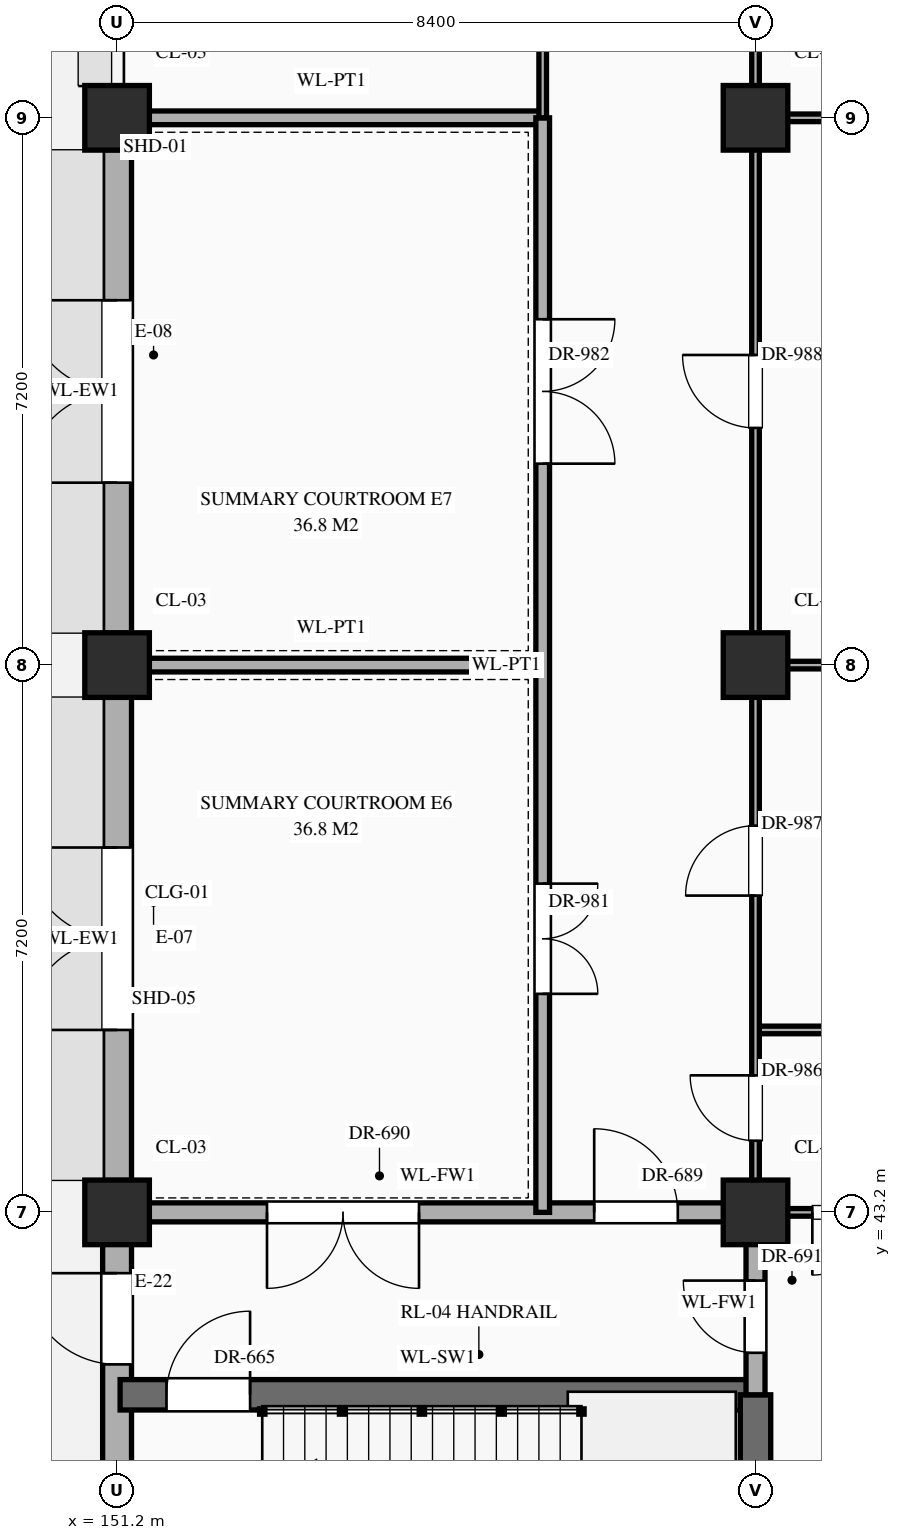
"""IFC4 building model, lengths in metres.
Left out: names, types, materials, properties, quantities, classifications, styles, units other than length and angle.
Written with IfcOpenShell. Run it as: python <this file> out.ifc"""

import sys

from ifc_helpers import new_model, si_unit, direction, frame, frame_2d, origin, origin_2d, place, context, subcontext, project, spatial, rectangle, extrude, element, fill, save


model = new_model("IFC4")
c1 = context("Model", 3, precision=1e-05, world=origin(), true_north=direction((0.0, 1.0)))
c2 = subcontext(c1, "Body", "Model", "MODEL_VIEW")
j1 = project(units=[si_unit("LENGTHUNIT", "METRE"), si_unit("PLANEANGLEUNIT", "RADIAN")], contexts=[c1])
p1 = place(None, origin())
s1 = spatial("IfcSite", under=j1, at=p1, CompositionType="ELEMENT")
p2 = place(p1, origin())
s2 = spatial("IfcBuilding", under=s1, at=p2, CompositionType="ELEMENT")
p3 = place(p2, origin())
s3 = spatial("IfcBuildingStorey", under=s2, at=p3, CompositionType="ELEMENT", Elevation=0.0)
for number, where, z_axis, x_axis in (
    (1, (151.2, 43.2, 0.0), (0.0, 0.0, 1.0), (1.0, 0.0, 0.0)),
    (2, (151.2, 50.4, 0.0), (0.0, 0.0, 1.0), (1.0, 0.0, 0.0)),
    (3, (151.2, 57.6, 0.0), (0.0, 0.0, 1.0), (1.0, 0.0, 0.0)),
    (4, (159.6, 43.2, 0.0), (0.0, 0.0, 1.0), (1.0, 0.0, 0.0)),
    (5, (159.6, 50.4, 0.0), (0.0, 0.0, 1.0), (1.0, 0.0, 0.0)),
    (6, (159.6, 57.6, 0.0), (0.0, 0.0, 1.0), (1.0, 0.0, 0.0)),
):
    element("IfcColumn", number, at=place(p3, frame(where, z_axis=z_axis, x_axis=x_axis)), inside=s3, PredefinedType="COLUMN", context=c2, shape_type="SweptSolid", body=[
        extrude(rectangle(XDim=0.85, YDim=0.85, at=origin_2d()), origin(), (0.0, 0.0, 1.0), 5.4),
    ])
p4 = place(p3, frame((151.2, 36.42, 0.0), z_axis=(0.0, 0.0, 1.0), x_axis=(0.0, 1.0, 0.0)))
e7 = element("IfcWall", 7, at=p4, inside=s3, PredefinedType="STANDARD", context=c2, shape_type="SweptSolid", body=[
    extrude(rectangle(XDim=6.36, YDim=0.38, at=frame_2d((3.18, 0.0))), origin(), (0.0, 0.0, 1.0), 4.47),
])
p5 = place(p4, frame((4.78, 0.0, 0.0)))
e8 = element("IfcOpeningElement", 8, at=p5, cuts=e7, PredefinedType="OPENING", context=c2, shape_type="SweptSolid", body=[
    extrude(rectangle(XDim=1.2, YDim=2.2, at=frame_2d((0.6, 1.1))), frame((0.0, 0.202, 0.0), z_axis=(0.0, -1.0, 0.0), x_axis=(1.0, 0.0, 0.0)), (0.0, 0.0, 1.0), 0.404),
])
p6 = place(p3, frame((151.2, 43.62, 0.0), z_axis=(0.0, 0.0, 1.0), x_axis=(0.0, 1.0, 0.0)))
e9 = element("IfcWall", 9, at=p6, inside=s3, PredefinedType="STANDARD", context=c2, shape_type="SweptSolid", body=[
    extrude(rectangle(XDim=6.36, YDim=0.38, at=frame_2d((3.18, 0.0))), origin(), (0.0, 0.0, 1.0), 4.47),
])
p7 = place(p6, frame((1.98, 0.0, 0.0)))
e10 = element("IfcOpeningElement", 10, at=p7, cuts=e9, PredefinedType="OPENING", context=c2, shape_type="SweptSolid", body=[
    extrude(rectangle(XDim=2.4, YDim=2.4, at=frame_2d((1.2, 1.2))), frame((0.0, 0.202, 0.0), z_axis=(0.0, -1.0, 0.0), x_axis=(1.0, 0.0, 0.0)), (0.0, 0.0, 1.0), 0.404),
])
p8 = place(p3, frame((151.2, 50.82, 0.0), z_axis=(0.0, 0.0, 1.0), x_axis=(0.0, 1.0, 0.0)))
e11 = element("IfcWall", 11, at=p8, inside=s3, PredefinedType="STANDARD", context=c2, shape_type="SweptSolid", body=[
    extrude(rectangle(XDim=6.36, YDim=0.38, at=frame_2d((3.18, 0.0))), origin(), (0.0, 0.0, 1.0), 4.47),
])
p9 = place(p8, frame((1.98, 0.0, 0.0)))
e12 = element("IfcOpeningElement", 12, at=p9, cuts=e11, PredefinedType="OPENING", context=c2, shape_type="SweptSolid", body=[
    extrude(rectangle(XDim=2.4, YDim=2.4, at=frame_2d((1.2, 1.2))), frame((0.0, 0.202, 0.0), z_axis=(0.0, -1.0, 0.0), x_axis=(1.0, 0.0, 0.0)), (0.0, 0.0, 1.0), 0.404),
])
p10 = place(p3, frame((151.24, 40.8, 0.0), z_axis=(0.0, 0.0, 1.0), x_axis=(1.0, 0.0, 0.0)))
e13 = element("IfcWall", 13, at=p10, inside=s3, PredefinedType="SHEAR", context=c2, shape_type="SweptSolid", body=[
    extrude(rectangle(XDim=8.36, YDim=0.4, at=frame_2d((4.18, 0.0))), origin(), (0.0, 0.0, 1.0), 5.12),
])
p11 = place(p10, frame((0.61, 0.0, 0.0)))
e14 = element("IfcOpeningElement", 14, at=p11, cuts=e13, PredefinedType="OPENING", context=c2, shape_type="SweptSolid", body=[
    extrude(rectangle(XDim=1.1, YDim=2.2, at=frame_2d((0.55, 1.1))), frame((0.0, 0.212, 0.0), z_axis=(0.0, -1.0, 0.0), x_axis=(1.0, 0.0, 0.0)), (0.0, 0.0, 1.0), 0.424),
])
p12 = place(p3, frame((151.24, 43.2, 0.0), z_axis=(0.0, 0.0, 1.0), x_axis=(1.0, 0.0, 0.0)))
e15 = element("IfcWall", 15, at=p12, inside=s3, PredefinedType="STANDARD", context=c2, shape_type="SweptSolid", body=[
    extrude(rectangle(XDim=8.36, YDim=0.25, at=frame_2d((4.18, 0.0))), origin(), (0.0, 0.0, 1.0), 4.27),
])
p13 = place(p12, frame((6.238, 0.0, 0.0)))
e16 = element("IfcOpeningElement", 16, at=p13, cuts=e15, PredefinedType="OPENING", context=c2, shape_type="SweptSolid", body=[
    extrude(rectangle(XDim=1.1, YDim=2.2, at=frame_2d((0.55, 1.1))), frame((0.0, 0.137, 0.0), z_axis=(0.0, -1.0, 0.0), x_axis=(1.0, 0.0, 0.0)), (0.0, 0.0, 1.0), 0.274),
])
p14 = place(p12, frame((1.933, 0.0, 0.0)))
e17 = element("IfcOpeningElement", 17, at=p14, cuts=e15, PredefinedType="OPENING", context=c2, shape_type="SweptSolid", body=[
    extrude(rectangle(XDim=2.0, YDim=2.4, at=frame_2d((1.0, 1.2))), frame((0.0, 0.137, 0.0), z_axis=(0.0, -1.0, 0.0), x_axis=(1.0, 0.0, 0.0)), (0.0, 0.0, 1.0), 0.274),
])
p15 = place(p3, frame((159.6, 43.2, 0.0), z_axis=(0.0, 0.0, 1.0), x_axis=(1.0, 0.0, 0.0)))
e18 = element("IfcWall", 18, at=p15, inside=s3, PredefinedType="STANDARD", context=c2, shape_type="SweptSolid", body=[
    extrude(rectangle(XDim=8.36, YDim=0.1, at=frame_2d((4.18, 0.0))), origin(), (0.0, 0.0, 1.0), 4.27),
])
p16 = place(p15, frame((0.748, 0.0, 0.0)))
e19 = element("IfcOpeningElement", 19, at=p16, cuts=e18, PredefinedType="OPENING", context=c2, shape_type="SweptSolid", body=[
    extrude(rectangle(XDim=1.65, YDim=2.4, at=frame_2d((0.825, 1.2))), frame((0.0, 0.062, 0.0), z_axis=(0.0, -1.0, 0.0), x_axis=(1.0, 0.0, 0.0)), (0.0, 0.0, 1.0), 0.124),
])
p17 = place(p3, frame((159.6, 45.6, 0.0), z_axis=(0.0, 0.0, 1.0), x_axis=(1.0, 0.0, 0.0)))
e20 = element("IfcWall", 20, at=p17, inside=s3, PredefinedType="STANDARD", context=c2, shape_type="SweptSolid", body=[
    extrude(rectangle(XDim=8.36, YDim=0.1, at=frame_2d((4.18, 0.0))), origin(), (0.0, 0.0, 1.0), 5.12),
])
p18 = place(p17, frame((0.91, 0.0, 0.0)))
e21 = element("IfcOpeningElement", 21, at=p18, cuts=e20, PredefinedType="OPENING", context=c2, shape_type="SweptSolid", body=[
    extrude(rectangle(XDim=0.98, YDim=2.35, at=frame_2d((0.49, 1.175))), frame((0.0, 0.062, 0.0), z_axis=(0.0, -1.0, 0.0), x_axis=(1.0, 0.0, 0.0)), (0.0, 0.0, 1.0), 0.124),
])
p19 = place(p3, frame((151.24, 50.4, 0.0), z_axis=(0.0, 0.0, 1.0), x_axis=(1.0, 0.0, 0.0)))
e22 = element("IfcWall", 22, at=p19, inside=s3, PredefinedType="STANDARD", context=c2, shape_type="SweptSolid", body=[
    extrude(rectangle(XDim=5.56, YDim=0.18, at=frame_2d((2.78, 0.0))), origin(), (0.0, 0.0, 1.0), 4.27),
])
p20 = place(p3, frame((159.6, 50.4, 0.0), z_axis=(0.0, 0.0, 1.0), x_axis=(1.0, 0.0, 0.0)))
e23 = element("IfcWall", 23, at=p20, inside=s3, PredefinedType="STANDARD", context=c2, shape_type="SweptSolid", body=[
    extrude(rectangle(XDim=8.36, YDim=0.1, at=frame_2d((4.18, 0.0))), origin(), (0.0, 0.0, 1.0), 4.27),
])
p21 = place(p3, frame((151.24, 57.6, 0.0), z_axis=(0.0, 0.0, 1.0), x_axis=(1.0, 0.0, 0.0)))
e24 = element("IfcWall", 24, at=p21, inside=s3, PredefinedType="STANDARD", context=c2, shape_type="SweptSolid", body=[
    extrude(rectangle(XDim=5.56, YDim=0.18, at=frame_2d((2.78, 0.0))), origin(), (0.0, 0.0, 1.0), 4.27),
])
p22 = place(p3, frame((159.6, 57.6, 0.0), z_axis=(0.0, 0.0, 1.0), x_axis=(1.0, 0.0, 0.0)))
e25 = element("IfcWall", 25, at=p22, inside=s3, PredefinedType="STANDARD", context=c2, shape_type="SweptSolid", body=[
    extrude(rectangle(XDim=8.36, YDim=0.1, at=frame_2d((4.18, 0.0))), origin(), (0.0, 0.0, 1.0), 4.27),
])
p23 = place(p3, frame((156.8, 43.2, 0.0), z_axis=(0.0, 0.0, 1.0), x_axis=(0.0, 1.0, 0.0)))
e26 = element("IfcWall", 26, at=p23, inside=s3, PredefinedType="STANDARD", context=c2, shape_type="SweptSolid", body=[
    extrude(rectangle(XDim=14.4, YDim=0.18, at=frame_2d((7.2, 0.0))), origin(), (0.0, 0.0, 1.0), 5.12),
])
p24 = place(p23, frame((2.875, 0.0, 0.0)))
e27 = element("IfcOpeningElement", 27, at=p24, cuts=e26, PredefinedType="OPENING", context=c2, shape_type="SweptSolid", body=[
    extrude(rectangle(XDim=1.45, YDim=2.3, at=frame_2d((0.725, 1.15))), frame((0.0, 0.102, 0.0), z_axis=(0.0, -1.0, 0.0), x_axis=(1.0, 0.0, 0.0)), (0.0, 0.0, 1.0), 0.204),
])
p25 = place(p23, frame((9.85, 0.0, 0.0)))
e28 = element("IfcOpeningElement", 28, at=p25, cuts=e26, PredefinedType="OPENING", context=c2, shape_type="SweptSolid", body=[
    extrude(rectangle(XDim=1.9, YDim=2.5, at=frame_2d((0.95, 1.25))), frame((0.0, 0.102, 0.0), z_axis=(0.0, -1.0, 0.0), x_axis=(1.0, 0.0, 0.0)), (0.0, 0.0, 1.0), 0.204),
])
p26 = place(p3, frame((156.8, 57.6, 0.0), z_axis=(0.0, 0.0, 1.0), x_axis=(0.0, 1.0, 0.0)))
e29 = element("IfcWall", 29, at=p26, inside=s3, PredefinedType="STANDARD", context=c2, shape_type="SweptSolid", body=[
    extrude(rectangle(XDim=26.4, YDim=0.1, at=frame_2d((13.2, 0.0))), origin(), (0.0, 0.0, 1.0), 5.12),
])
p27 = place(p26, frame((23.38, 0.0, 0.0)))
e30 = element("IfcOpeningElement", 30, at=p27, cuts=e29, PredefinedType="OPENING", context=c2, shape_type="SweptSolid", body=[
    extrude(rectangle(XDim=1.24, YDim=2.3, at=frame_2d((0.62, 1.15))), frame((0.0, 0.062, 0.0), z_axis=(0.0, -1.0, 0.0), x_axis=(1.0, 0.0, 0.0)), (0.0, 0.0, 1.0), 0.124),
])
p28 = place(p26, frame((3.07, 0.0, 0.0)))
e31 = element("IfcOpeningElement", 31, at=p28, cuts=e29, PredefinedType="OPENING", context=c2, shape_type="SweptSolid", body=[
    extrude(rectangle(XDim=1.06, YDim=2.4, at=frame_2d((0.53, 1.2))), frame((0.0, 0.062, 0.0), z_axis=(0.0, -1.0, 0.0), x_axis=(1.0, 0.0, 0.0)), (0.0, 0.0, 1.0), 0.124),
])
p29 = place(p26, frame((10.23, 0.0, 0.0)))
e32 = element("IfcOpeningElement", 32, at=p29, cuts=e29, PredefinedType="OPENING", context=c2, shape_type="SweptSolid", body=[
    extrude(rectangle(XDim=1.14, YDim=2.4, at=frame_2d((0.57, 1.2))), frame((0.0, 0.062, 0.0), z_axis=(0.0, -1.0, 0.0), x_axis=(1.0, 0.0, 0.0)), (0.0, 0.0, 1.0), 0.124),
])
p30 = place(p26, frame((17.55, 0.0, 0.0)))
e33 = element("IfcOpeningElement", 33, at=p30, cuts=e29, PredefinedType="OPENING", context=c2, shape_type="SweptSolid", body=[
    extrude(rectangle(XDim=0.9, YDim=2.15, at=frame_2d((0.45, 1.075))), frame((0.0, 0.062, 0.0), z_axis=(0.0, -1.0, 0.0), x_axis=(1.0, 0.0, 0.0)), (0.0, 0.0, 1.0), 0.124),
])
p31 = place(p3, frame((159.6, 36.0, 0.0), z_axis=(0.0, 0.0, 1.0), x_axis=(0.0, 1.0, 0.0)))
e34 = element("IfcWall", 34, at=p31, inside=s3, PredefinedType="SHEAR", context=c2, shape_type="SweptSolid", body=[
    extrude(rectangle(XDim=4.8, YDim=0.4, at=frame_2d((2.4, 0.0))), origin(), (0.0, 0.0, 1.0), 5.12),
])
p32 = place(p3, frame((159.6, 40.8, 0.0), z_axis=(0.0, 0.0, 1.0), x_axis=(0.0, 1.0, 0.0)))
e35 = element("IfcWall", 35, at=p32, inside=s3, PredefinedType="STANDARD", context=c2, shape_type="SweptSolid", body=[
    extrude(rectangle(XDim=2.4, YDim=0.25, at=frame_2d((1.2, 0.0))), origin(), (0.0, 0.0, 1.0), 4.37),
])
p33 = place(p32, frame((0.552, 0.0, 0.0)))
e36 = element("IfcOpeningElement", 36, at=p33, cuts=e35, PredefinedType="OPENING", context=c2, shape_type="SweptSolid", body=[
    extrude(rectangle(XDim=0.95, YDim=2.15, at=frame_2d((0.475, 1.075))), frame((0.0, 0.137, 0.0), z_axis=(0.0, -1.0, 0.0), x_axis=(1.0, 0.0, 0.0)), (0.0, 0.0, 1.0), 0.274),
])
p34 = place(p3, frame((159.6, 43.2, 0.0), z_axis=(0.0, 0.0, 1.0), x_axis=(0.0, 1.0, 0.0)))
e37 = element("IfcWall", 37, at=p34, inside=s3, PredefinedType="STANDARD", context=c2, shape_type="SweptSolid", body=[
    extrude(rectangle(XDim=40.8, YDim=0.1, at=frame_2d((20.4, 0.0))), origin(), (0.0, 0.0, 1.0), 4.37),
])
p35 = place(p34, frame((37.933, 0.0, 0.0)))
e38 = element("IfcOpeningElement", 38, at=p35, cuts=e37, PredefinedType="OPENING", context=c2, shape_type="SweptSolid", body=[
    extrude(rectangle(XDim=1.28, YDim=2.35, at=frame_2d((0.64, 1.175))), frame((0.0, 0.062, 0.0), z_axis=(0.0, -1.0, 0.0), x_axis=(1.0, 0.0, 0.0)), (0.0, 0.0, 1.0), 0.124),
])
p36 = place(p34, frame((0.942, 0.0, 0.0)))
e39 = element("IfcOpeningElement", 39, at=p36, cuts=e37, PredefinedType="OPENING", context=c2, shape_type="SweptSolid", body=[
    extrude(rectangle(XDim=0.86, YDim=2.1, at=frame_2d((0.43, 1.05))), frame((0.0, 0.062, 0.0), z_axis=(0.0, -1.0, 0.0), x_axis=(1.0, 0.0, 0.0)), (0.0, 0.0, 1.0), 0.124),
])
p37 = place(p34, frame((4.167, 0.0, 0.0)))
e40 = element("IfcOpeningElement", 40, at=p37, cuts=e37, PredefinedType="OPENING", context=c2, shape_type="SweptSolid", body=[
    extrude(rectangle(XDim=0.92, YDim=2.15, at=frame_2d((0.46, 1.075))), frame((0.0, 0.062, 0.0), z_axis=(0.0, -1.0, 0.0), x_axis=(1.0, 0.0, 0.0)), (0.0, 0.0, 1.0), 0.124),
])
p38 = place(p34, frame((10.32, 0.0, 0.0)))
e41 = element("IfcOpeningElement", 41, at=p38, cuts=e37, PredefinedType="OPENING", context=c2, shape_type="SweptSolid", body=[
    extrude(rectangle(XDim=0.96, YDim=2.2, at=frame_2d((0.48, 1.1))), frame((0.0, 0.062, 0.0), z_axis=(0.0, -1.0, 0.0), x_axis=(1.0, 0.0, 0.0)), (0.0, 0.0, 1.0), 0.124),
])
p39 = place(p34, frame((17.5, 0.0, 0.0)))
e42 = element("IfcOpeningElement", 42, at=p39, cuts=e37, PredefinedType="OPENING", context=c2, shape_type="SweptSolid", body=[
    extrude(rectangle(XDim=1.0, YDim=2.25, at=frame_2d((0.5, 1.125))), frame((0.0, 0.062, 0.0), z_axis=(0.0, -1.0, 0.0), x_axis=(1.0, 0.0, 0.0)), (0.0, 0.0, 1.0), 0.124),
])
p40 = place(p34, frame((24.68, 0.0, 0.0)))
e43 = element("IfcOpeningElement", 43, at=p40, cuts=e37, PredefinedType="OPENING", context=c2, shape_type="SweptSolid", body=[
    extrude(rectangle(XDim=1.04, YDim=2.2, at=frame_2d((0.52, 1.1))), frame((0.0, 0.062, 0.0), z_axis=(0.0, -1.0, 0.0), x_axis=(1.0, 0.0, 0.0)), (0.0, 0.0, 1.0), 0.124),
])
p41 = place(p34, frame((31.86, 0.0, 0.0)))
e44 = element("IfcOpeningElement", 44, at=p41, cuts=e37, PredefinedType="OPENING", context=c2, shape_type="SweptSolid", body=[
    extrude(rectangle(XDim=1.08, YDim=2.25, at=frame_2d((0.54, 1.125))), frame((0.0, 0.062, 0.0), z_axis=(0.0, -1.0, 0.0), x_axis=(1.0, 0.0, 0.0)), (0.0, 0.0, 1.0), 0.124),
])
p42 = place(p5, origin())
e45 = element("IfcDoor", 45, at=p42, inside=s3, OperationType="SINGLE_SWING_RIGHT", PredefinedType="DOOR", context=c2, shape_type="SweptSolid", body=[
    extrude(rectangle(XDim=1.2, YDim=2.2, at=frame_2d((0.6, 1.1))), frame((0.0, 0.025, 0.0), z_axis=(0.0, -1.0, 0.0), x_axis=(1.0, 0.0, 0.0)), (0.0, 0.0, 1.0), 0.05),
])
fill(e8, e45)
p43 = place(p7, origin())
e46 = element("IfcDoor", 46, at=p43, inside=s3, OperationType="DOUBLE_DOOR_SINGLE_SWING", PredefinedType="DOOR", context=c2, shape_type="SweptSolid", body=[
    extrude(rectangle(XDim=2.4, YDim=2.4, at=frame_2d((1.2, 1.2))), frame((0.0, 0.025, 0.0), z_axis=(0.0, -1.0, 0.0), x_axis=(1.0, 0.0, 0.0)), (0.0, 0.0, 1.0), 0.05),
])
fill(e10, e46)
p44 = place(p9, origin())
e47 = element("IfcDoor", 47, at=p44, inside=s3, OperationType="DOUBLE_DOOR_SINGLE_SWING", PredefinedType="DOOR", context=c2, shape_type="SweptSolid", body=[
    extrude(rectangle(XDim=2.4, YDim=2.4, at=frame_2d((1.2, 1.2))), frame((0.0, 0.025, 0.0), z_axis=(0.0, -1.0, 0.0), x_axis=(1.0, 0.0, 0.0)), (0.0, 0.0, 1.0), 0.05),
])
fill(e12, e47)
p45 = place(p11, origin())
e48 = element("IfcDoor", 48, at=p45, inside=s3, OperationType="SINGLE_SWING_RIGHT", PredefinedType="DOOR", context=c2, shape_type="SweptSolid", body=[
    extrude(rectangle(XDim=1.1, YDim=2.2, at=frame_2d((0.55, 1.1))), frame((0.0, 0.025, 0.0), z_axis=(0.0, -1.0, 0.0), x_axis=(1.0, 0.0, 0.0)), (0.0, 0.0, 1.0), 0.05),
])
fill(e14, e48)
p46 = place(p13, origin())
e49 = element("IfcDoor", 49, at=p46, inside=s3, OperationType="SINGLE_SWING_LEFT", PredefinedType="DOOR", context=c2, shape_type="SweptSolid", body=[
    extrude(rectangle(XDim=1.1, YDim=2.2, at=frame_2d((0.55, 1.1))), frame((0.0, 0.025, 0.0), z_axis=(0.0, -1.0, 0.0), x_axis=(1.0, 0.0, 0.0)), (0.0, 0.0, 1.0), 0.05),
])
fill(e16, e49)
p47 = place(p14, frame((2.0, 0.0, 0.0), z_axis=(0.0, 0.0, 1.0), x_axis=(-1.0, 0.0, 0.0)))
e50 = element("IfcDoor", 50, at=p47, inside=s3, OperationType="DOUBLE_DOOR_SINGLE_SWING", PredefinedType="DOOR", context=c2, shape_type="SweptSolid", body=[
    extrude(rectangle(XDim=2.0, YDim=2.4, at=frame_2d((1.0, 1.2))), frame((0.0, 0.025, 0.0), z_axis=(0.0, -1.0, 0.0), x_axis=(1.0, 0.0, 0.0)), (0.0, 0.0, 1.0), 0.05),
])
fill(e17, e50)
p48 = place(p33, origin())
e51 = element("IfcDoor", 51, at=p48, inside=s3, OperationType="SINGLE_SWING_RIGHT", PredefinedType="DOOR", context=c2, shape_type="SweptSolid", body=[
    extrude(rectangle(XDim=0.95, YDim=2.15, at=frame_2d((0.475, 1.075))), frame((0.0, 0.025, 0.0), z_axis=(0.0, -1.0, 0.0), x_axis=(1.0, 0.0, 0.0)), (0.0, 0.0, 1.0), 0.05),
])
fill(e36, e51)
p49 = place(p24, frame((1.45, 0.0, 0.0), z_axis=(0.0, 0.0, 1.0), x_axis=(-1.0, 0.0, 0.0)))
e52 = element("IfcDoor", 52, at=p49, inside=s3, OperationType="DOUBLE_DOOR_SINGLE_SWING", PredefinedType="DOOR", context=c2, shape_type="SweptSolid", body=[
    extrude(rectangle(XDim=1.45, YDim=2.3, at=frame_2d((0.725, 1.15))), frame((0.0, 0.025, 0.0), z_axis=(0.0, -1.0, 0.0), x_axis=(1.0, 0.0, 0.0)), (0.0, 0.0, 1.0), 0.05),
])
fill(e27, e52)
p50 = place(p25, frame((1.9, 0.0, 0.0), z_axis=(0.0, 0.0, 1.0), x_axis=(-1.0, 0.0, 0.0)))
e53 = element("IfcDoor", 53, at=p50, inside=s3, OperationType="DOUBLE_DOOR_SINGLE_SWING", PredefinedType="DOOR", context=c2, shape_type="SweptSolid", body=[
    extrude(rectangle(XDim=1.9, YDim=2.5, at=frame_2d((0.95, 1.25))), frame((0.0, 0.025, 0.0), z_axis=(0.0, -1.0, 0.0), x_axis=(1.0, 0.0, 0.0)), (0.0, 0.0, 1.0), 0.05),
])
fill(e28, e53)
p51 = place(p36, origin())
e54 = element("IfcDoor", 54, at=p51, inside=s3, OperationType="SINGLE_SWING_RIGHT", PredefinedType="DOOR", context=c2, shape_type="SweptSolid", body=[
    extrude(rectangle(XDim=0.86, YDim=2.1, at=frame_2d((0.43, 1.05))), frame((0.0, 0.025, 0.0), z_axis=(0.0, -1.0, 0.0), x_axis=(1.0, 0.0, 0.0)), (0.0, 0.0, 1.0), 0.05),
])
fill(e39, e54)
p52 = place(p37, origin())
e55 = element("IfcDoor", 55, at=p52, inside=s3, OperationType="SINGLE_SWING_LEFT", PredefinedType="DOOR", context=c2, shape_type="SweptSolid", body=[
    extrude(rectangle(XDim=0.92, YDim=2.15, at=frame_2d((0.46, 1.075))), frame((0.0, 0.025, 0.0), z_axis=(0.0, -1.0, 0.0), x_axis=(1.0, 0.0, 0.0)), (0.0, 0.0, 1.0), 0.05),
])
fill(e40, e55)
p53 = place(p38, origin())
e56 = element("IfcDoor", 56, at=p53, inside=s3, OperationType="SINGLE_SWING_RIGHT", PredefinedType="DOOR", context=c2, shape_type="SweptSolid", body=[
    extrude(rectangle(XDim=0.96, YDim=2.2, at=frame_2d((0.48, 1.1))), frame((0.0, 0.025, 0.0), z_axis=(0.0, -1.0, 0.0), x_axis=(1.0, 0.0, 0.0)), (0.0, 0.0, 1.0), 0.05),
])
fill(e41, e56)
p54 = place(p16, frame((1.65, 0.0, 0.0), z_axis=(0.0, 0.0, 1.0), x_axis=(-1.0, 0.0, 0.0)))
e57 = element("IfcDoor", 57, at=p54, inside=s3, OperationType="DOUBLE_DOOR_SINGLE_SWING", PredefinedType="DOOR", context=c2, shape_type="SweptSolid", body=[
    extrude(rectangle(XDim=1.65, YDim=2.4, at=frame_2d((0.825, 1.2))), frame((0.0, 0.025, 0.0), z_axis=(0.0, -1.0, 0.0), x_axis=(1.0, 0.0, 0.0)), (0.0, 0.0, 1.0), 0.05),
])
fill(e19, e57)
save(model, sys.argv[1])
